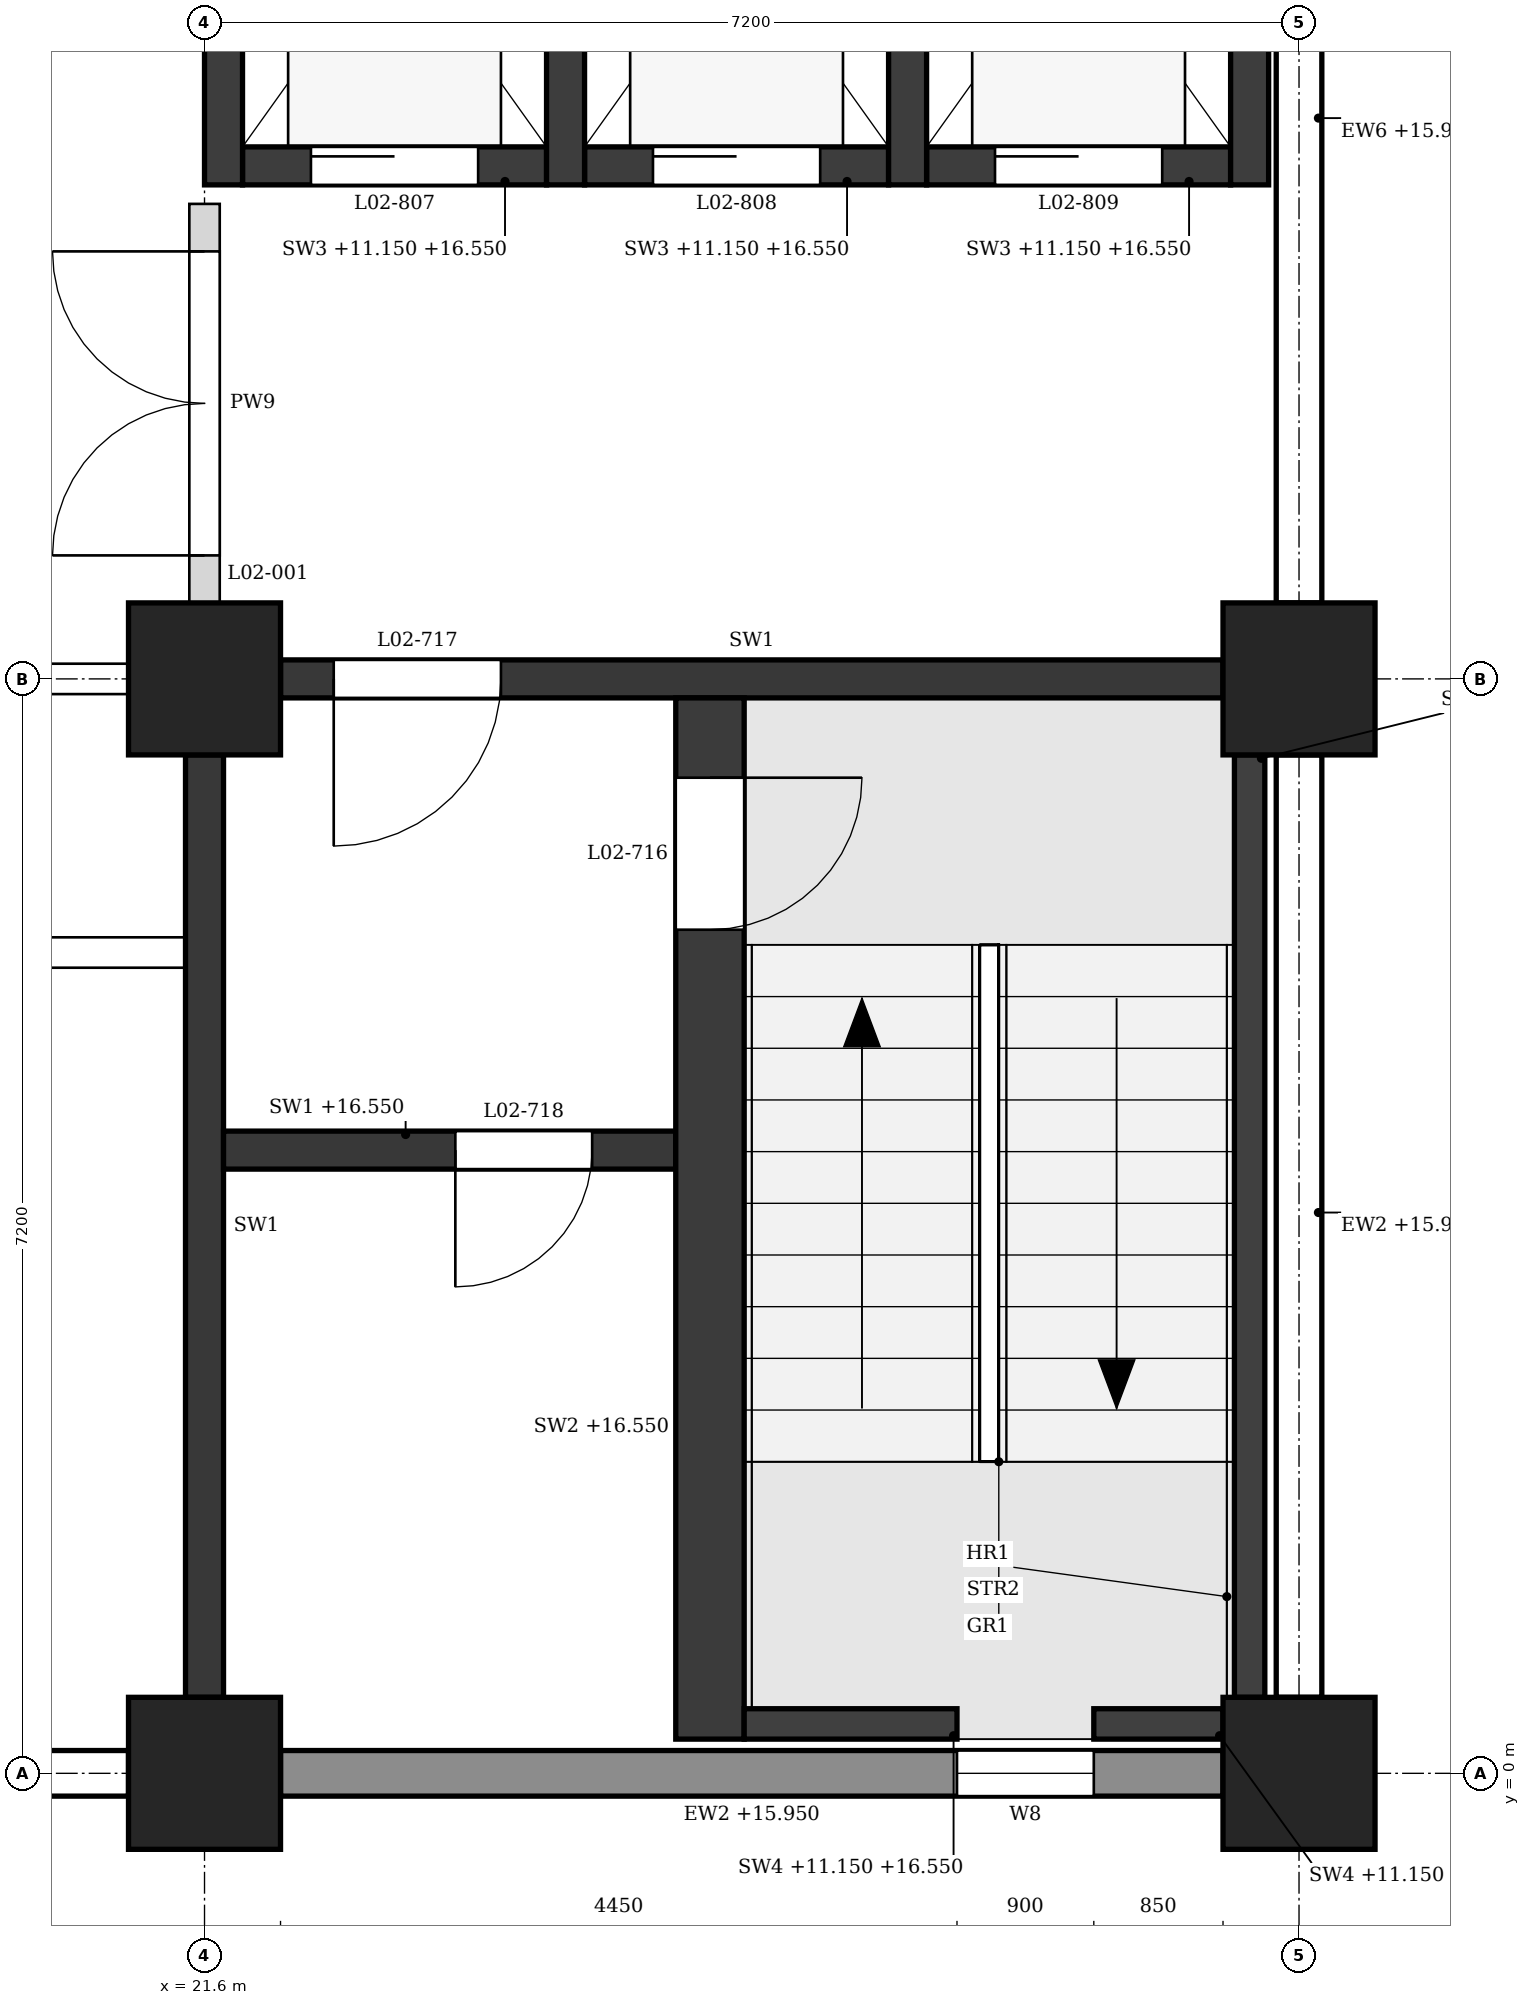
"""IFC4 building model, lengths in metres.
Left out: names, types, materials, properties, quantities, classifications, styles, units other than length and angle.
Written with IfcOpenShell. Run it as: python <this file> out.ifc"""

import sys

from ifc_helpers import new_model, si_unit, direction, frame, frame_2d, origin, origin_2d, place, context, subcontext, project, spatial, polyline, rectangle, outline, extrude, element, fill, save


model = new_model("IFC4")
c1 = context("Model", 3, precision=1e-05, world=origin(), true_north=direction((0.0, 1.0)))
c2 = subcontext(c1, "Body", "Model", "MODEL_VIEW")
j1 = project(units=[si_unit("LENGTHUNIT", "METRE"), si_unit("PLANEANGLEUNIT", "RADIAN")], contexts=[c1])
p1 = place(None, origin())
s1 = spatial("IfcSite", under=j1, at=p1, CompositionType="ELEMENT")
p2 = place(p1, origin())
s2 = spatial("IfcBuilding", under=s1, at=p2, CompositionType="ELEMENT")
p3 = place(p2, frame((0.0, 0.0, 11.4)))
s3 = spatial("IfcBuildingStorey", under=s2, at=p3, CompositionType="ELEMENT", Elevation=11.4)
for number, where, z_axis, x_axis in (
    (1, (21.6, 0.0, 0.0), (0.0, 0.0, 1.0), (1.0, 0.0, 0.0)),
    (2, (21.6, 7.2, 0.0), (0.0, 0.0, 1.0), (1.0, 0.0, 0.0)),
    (3, (28.8, 0.0, 0.0), (0.0, 0.0, 1.0), (1.0, 0.0, 0.0)),
    (4, (28.8, 7.2, 0.0), (0.0, 0.0, 1.0), (1.0, 0.0, 0.0)),
):
    element("IfcColumn", number, at=place(p3, frame(where, z_axis=z_axis, x_axis=x_axis)), inside=s3, PredefinedType="COLUMN", context=c2, shape_type="SweptSolid", body=[
        extrude(rectangle(XDim=1.0, YDim=1.0, at=origin_2d()), origin(), (0.0, 0.0, 1.0), 5.4),
    ])
p4 = place(p3, frame((14.9, 0.0, 0.0), z_axis=(0.0, 0.0, 1.0), x_axis=(1.0, 0.0, 0.0)))
e5 = element("IfcWall", 5, at=p4, inside=s3, PredefinedType="STANDARD", context=c2, shape_type="SweptSolid", body=[
    extrude(rectangle(XDim=6.2, YDim=0.3, at=frame_2d((3.1, 0.0))), origin(), (0.0, 0.0, 1.0), 4.55),
])
p5 = place(p4, frame((0.55, 0.0, 0.9)))
e6 = element("IfcOpeningElement", 6, at=p5, cuts=e5, PredefinedType="OPENING", context=c2, shape_type="SweptSolid", body=[
    extrude(outline(polyline([(0.0, 0.0), (1.5, 0.0), (1.5, 2.35), (0.75, 3.1), (0.0, 2.35), (0.0, 0.0)])), frame((0.0, 0.16, 0.0), z_axis=(0.0, -1.0, 0.0), x_axis=(1.0, 0.0, 0.0)), (0.0, 0.0, 1.0), 0.32),
])
p6 = place(p4, frame((4.15, 0.0, 0.9)))
e7 = element("IfcOpeningElement", 7, at=p6, cuts=e5, PredefinedType="OPENING", context=c2, shape_type="SweptSolid", body=[
    extrude(outline(polyline([(0.0, 0.0), (1.5, 0.0), (1.5, 2.35), (0.75, 3.1), (0.0, 2.35), (0.0, 0.0)])), frame((0.0, 0.16, 0.0), z_axis=(0.0, -1.0, 0.0), x_axis=(1.0, 0.0, 0.0)), (0.0, 0.0, 1.0), 0.32),
])
p7 = place(p3, frame((22.1, 0.0, 0.0), z_axis=(0.0, 0.0, 1.0), x_axis=(1.0, 0.0, 0.0)))
e8 = element("IfcWall", 8, at=p7, inside=s3, PredefinedType="STANDARD", context=c2, shape_type="SweptSolid", body=[
    extrude(rectangle(XDim=6.2, YDim=0.3, at=frame_2d((3.1, 0.0))), origin(), (0.0, 0.0, 1.0), 4.55),
])
p8 = place(p7, frame((4.45, 0.0, 0.9)))
e9 = element("IfcOpeningElement", 9, at=p8, cuts=e8, PredefinedType="OPENING", context=c2, shape_type="SweptSolid", body=[
    extrude(outline(polyline([(0.0, 0.0), (0.9, 0.0), (0.9, 2.65), (0.45, 3.1), (0.0, 2.65), (0.0, 0.0)])), frame((0.0, 0.16, 0.0), z_axis=(0.0, -1.0, 0.0), x_axis=(1.0, 0.0, 0.0)), (0.0, 0.0, 1.0), 0.32),
])
for number, where, z_axis, x_axis in (
    (10, (28.8, 0.5, 0.0), (0.0, 0.0, 1.0), (0.0, 1.0, 0.0)),
    (11, (28.8, 7.7, 0.0), (0.0, 0.0, 1.0), (0.0, 1.0, 0.0)),
):
    element("IfcWall", number, at=place(p3, frame(where, z_axis=z_axis, x_axis=x_axis)), inside=s3, PredefinedType="STANDARD", context=c2, shape_type="SweptSolid", body=[
        extrude(rectangle(XDim=6.2, YDim=0.3, at=frame_2d((3.1, 0.0))), origin(), (0.0, 0.0, 1.0), 4.55),
    ])
p9 = place(p3, frame((22.1, 7.2, 0.0), z_axis=(0.0, 0.0, 1.0), x_axis=(1.0, 0.0, 0.0)))
e12 = element("IfcWall", 12, at=p9, inside=s3, PredefinedType="SHEAR", context=c2, shape_type="SweptSolid", body=[
    extrude(rectangle(XDim=6.2, YDim=0.25, at=frame_2d((3.1, 0.0))), origin(), (0.0, 0.0, 1.0), 4.4),
])
p10 = place(p9, frame((0.35, 0.0, 0.0)))
e13 = element("IfcOpeningElement", 13, at=p10, cuts=e12, PredefinedType="OPENING", context=c2, shape_type="SweptSolid", body=[
    extrude(rectangle(XDim=1.1, YDim=2.1, at=frame_2d((0.55, 1.05))), frame((0.0, 0.135, 0.0), z_axis=(0.0, -1.0, 0.0), x_axis=(1.0, 0.0, 0.0)), (0.0, 0.0, 1.0), 0.27),
])
p11 = place(p3, frame((21.6, 0.5, 0.0), z_axis=(0.0, 0.0, 1.0), x_axis=(0.0, 1.0, 0.0)))
e14 = element("IfcWall", 14, at=p11, inside=s3, PredefinedType="SHEAR", context=c2, shape_type="SweptSolid", body=[
    extrude(rectangle(XDim=6.2, YDim=0.25, at=frame_2d((3.1, 0.0))), origin(), (0.0, 0.0, 1.0), 4.4),
])
p12 = place(p3, frame((28.475, 0.5, -0.25), z_axis=(0.0, 0.0, 1.0), x_axis=(0.0, 1.0, 0.0)))
e15 = element("IfcWall", 15, at=p12, inside=s3, PredefinedType="SHEAR", context=c2, shape_type="SweptSolid", body=[
    extrude(rectangle(XDim=6.2, YDim=0.2, at=frame_2d((3.1, 0.0))), origin(), (0.0, 0.0, 1.0), 5.4),
])
p13 = place(p3, frame((25.15, 0.325, -0.25), z_axis=(0.0, 0.0, 1.0), x_axis=(1.0, 0.0, 0.0)))
e16 = element("IfcWall", 16, at=p13, inside=s3, PredefinedType="SHEAR", context=c2, shape_type="SweptSolid", body=[
    extrude(rectangle(XDim=1.4, YDim=0.2, at=frame_2d((0.7, 0.0))), origin(), (0.0, 0.0, 1.0), 5.4),
])
p14 = place(p3, frame((27.45, 0.325, -0.25), z_axis=(0.0, 0.0, 1.0), x_axis=(1.0, 0.0, 0.0)))
e17 = element("IfcWall", 17, at=p14, inside=s3, PredefinedType="SHEAR", context=c2, shape_type="SweptSolid", body=[
    extrude(rectangle(XDim=0.85, YDim=0.2, at=frame_2d((0.425, 0.0))), origin(), (0.0, 0.0, 1.0), 5.4),
])
p15 = place(p3, frame((24.925, 0.225, 0.0), z_axis=(0.0, 0.0, 1.0), x_axis=(0.0, 1.0, 0.0)))
e18 = element("IfcWall", 18, at=p15, inside=s3, PredefinedType="SHEAR", context=c2, shape_type="SweptSolid", body=[
    extrude(rectangle(XDim=6.85, YDim=0.45, at=frame_2d((3.425, 0.0))), origin(), (0.0, 0.0, 1.0), 5.15),
])
p16 = place(p15, frame((5.325, 0.0, 0.0)))
e19 = element("IfcOpeningElement", 19, at=p16, cuts=e18, PredefinedType="OPENING", context=c2, shape_type="SweptSolid", body=[
    extrude(rectangle(XDim=1.0, YDim=2.1, at=frame_2d((0.5, 1.05))), frame((0.0, 0.235, 0.0), z_axis=(0.0, -1.0, 0.0), x_axis=(1.0, 0.0, 0.0)), (0.0, 0.0, 1.0), 0.47),
])
p17 = place(p3, frame((21.725, 4.1, 0.0), z_axis=(0.0, 0.0, 1.0), x_axis=(1.0, 0.0, 0.0)))
e20 = element("IfcWall", 20, at=p17, inside=s3, PredefinedType="SHEAR", context=c2, shape_type="SweptSolid", body=[
    extrude(rectangle(XDim=2.975, YDim=0.25, at=frame_2d((1.487, 0.0))), origin(), (0.0, 0.0, 1.0), 5.15),
])
p18 = place(p17, frame((1.525, 0.0, 0.0)))
e21 = element("IfcOpeningElement", 21, at=p18, cuts=e20, PredefinedType="OPENING", context=c2, shape_type="SweptSolid", body=[
    extrude(rectangle(XDim=0.9, YDim=2.1, at=frame_2d((0.45, 1.05))), frame((0.0, 0.135, 0.0), z_axis=(0.0, -1.0, 0.0), x_axis=(1.0, 0.0, 0.0)), (0.0, 0.0, 1.0), 0.27),
])
p19 = place(p3, frame((21.725, 10.45, -0.25), z_axis=(0.0, 0.0, 1.0), x_axis=(0.0, 1.0, 0.0)))
e22 = element("IfcWall", 22, at=p19, inside=s3, PredefinedType="SHEAR", context=c2, shape_type="SweptSolid", body=[
    extrude(rectangle(XDim=3.45, YDim=0.25, at=frame_2d((1.725, 0.0))), origin(), (0.0, 0.0, 1.0), 4.65),
])
for number, where, z_axis, x_axis in (
    (23, (23.975, 10.45, -0.25), (0.0, 0.0, 1.0), (0.0, 1.0, 0.0)),
    (24, (26.225, 10.45, -0.25), (0.0, 0.0, 1.0), (0.0, 1.0, 0.0)),
):
    element("IfcWall", number, at=place(p3, frame(where, z_axis=z_axis, x_axis=x_axis)), inside=s3, PredefinedType="SHEAR", context=c2, shape_type="SweptSolid", body=[
        extrude(rectangle(XDim=3.3, YDim=0.25, at=frame_2d((1.65, 0.0))), origin(), (0.0, 0.0, 1.0), 5.4),
    ])
p20 = place(p3, frame((28.475, 10.45, -0.25), z_axis=(0.0, 0.0, 1.0), x_axis=(0.0, 1.0, 0.0)))
e25 = element("IfcWall", 25, at=p20, inside=s3, PredefinedType="SHEAR", context=c2, shape_type="SweptSolid", body=[
    extrude(rectangle(XDim=3.45, YDim=0.25, at=frame_2d((1.725, 0.0))), origin(), (0.0, 0.0, 1.0), 5.4),
])
p21 = place(p3, frame((21.85, 10.575, -0.25), z_axis=(0.0, 0.0, 1.0), x_axis=(1.0, 0.0, 0.0)))
e26 = element("IfcWall", 26, at=p21, inside=s3, PredefinedType="SHEAR", context=c2, shape_type="SweptSolid", body=[
    extrude(rectangle(XDim=2.0, YDim=0.25, at=frame_2d((1.0, 0.0))), origin(), (0.0, 0.0, 1.0), 5.4),
])
p22 = place(p21, frame((0.45, 0.0, 0.25)))
e27 = element("IfcOpeningElement", 27, at=p22, cuts=e26, PredefinedType="OPENING", context=c2, shape_type="SweptSolid", body=[
    extrude(rectangle(XDim=1.1, YDim=2.1, at=frame_2d((0.55, 1.05))), frame((0.0, 0.135, 0.0), z_axis=(0.0, -1.0, 0.0), x_axis=(1.0, 0.0, 0.0)), (0.0, 0.0, 1.0), 0.27),
])
p23 = place(p3, frame((24.1, 10.575, -0.25), z_axis=(0.0, 0.0, 1.0), x_axis=(1.0, 0.0, 0.0)))
e28 = element("IfcWall", 28, at=p23, inside=s3, PredefinedType="SHEAR", context=c2, shape_type="SweptSolid", body=[
    extrude(rectangle(XDim=2.0, YDim=0.25, at=frame_2d((1.0, 0.0))), origin(), (0.0, 0.0, 1.0), 5.4),
])
p24 = place(p23, frame((0.45, 0.0, 0.25)))
e29 = element("IfcOpeningElement", 29, at=p24, cuts=e28, PredefinedType="OPENING", context=c2, shape_type="SweptSolid", body=[
    extrude(rectangle(XDim=1.1, YDim=2.1, at=frame_2d((0.55, 1.05))), frame((0.0, 0.135, 0.0), z_axis=(0.0, -1.0, 0.0), x_axis=(1.0, 0.0, 0.0)), (0.0, 0.0, 1.0), 0.27),
])
p25 = place(p3, frame((26.35, 10.575, -0.25), z_axis=(0.0, 0.0, 1.0), x_axis=(1.0, 0.0, 0.0)))
e30 = element("IfcWall", 30, at=p25, inside=s3, PredefinedType="SHEAR", context=c2, shape_type="SweptSolid", body=[
    extrude(rectangle(XDim=2.0, YDim=0.25, at=frame_2d((1.0, 0.0))), origin(), (0.0, 0.0, 1.0), 5.4),
])
p26 = place(p25, frame((0.45, 0.0, 0.25)))
e31 = element("IfcOpeningElement", 31, at=p26, cuts=e30, PredefinedType="OPENING", context=c2, shape_type="SweptSolid", body=[
    extrude(rectangle(XDim=1.1, YDim=2.1, at=frame_2d((0.55, 1.05))), frame((0.0, 0.135, 0.0), z_axis=(0.0, -1.0, 0.0), x_axis=(1.0, 0.0, 0.0)), (0.0, 0.0, 1.0), 0.27),
])
p27 = place(p3, frame((7.325, 5.4, 0.0), z_axis=(0.0, 0.0, 1.0), x_axis=(1.0, 0.0, 0.0)))
e32 = element("IfcWall", 32, at=p27, inside=s3, PredefinedType="PARTITIONING", context=c2, shape_type="SweptSolid", body=[
    extrude(outline(polyline([(0.0, 0.0), (14.15, 0.0), (14.15, 4.4), (14.025, 4.4), (14.025, 5.15), (7.325, 5.15), (7.325, 4.4), (6.825, 4.4), (6.825, 5.15), (0.125, 5.15), (0.125, 4.4), (0.0, 4.4), (0.0, 0.0)])), frame((0.0, 0.1, 0.0), z_axis=(0.0, -1.0, 0.0), x_axis=(1.0, 0.0, 0.0)), (0.0, 0.0, 1.0), 0.2),
])
p28 = place(p27, frame((1.238, 0.0, 0.0)))
e33 = element("IfcOpeningElement", 33, at=p28, cuts=e32, PredefinedType="OPENING", context=c2, shape_type="SweptSolid", body=[
    extrude(rectangle(XDim=1.0, YDim=2.1, at=frame_2d((0.5, 1.05))), frame((0.0, 0.11, 0.0), z_axis=(0.0, -1.0, 0.0), x_axis=(1.0, 0.0, 0.0)), (0.0, 0.0, 1.0), 0.22),
])
p29 = place(p27, frame((4.775, 0.0, 0.0)))
e34 = element("IfcOpeningElement", 34, at=p29, cuts=e32, PredefinedType="OPENING", context=c2, shape_type="SweptSolid", body=[
    extrude(rectangle(XDim=1.0, YDim=2.1, at=frame_2d((0.5, 1.05))), frame((0.0, 0.11, 0.0), z_axis=(0.0, -1.0, 0.0), x_axis=(1.0, 0.0, 0.0)), (0.0, 0.0, 1.0), 0.22),
])
p30 = place(p27, frame((8.375, 0.0, 0.0)))
e35 = element("IfcOpeningElement", 35, at=p30, cuts=e32, PredefinedType="OPENING", context=c2, shape_type="SweptSolid", body=[
    extrude(rectangle(XDim=1.0, YDim=2.1, at=frame_2d((0.5, 1.05))), frame((0.0, 0.11, 0.0), z_axis=(0.0, -1.0, 0.0), x_axis=(1.0, 0.0, 0.0)), (0.0, 0.0, 1.0), 0.22),
])
p31 = place(p27, frame((11.913, 0.0, 0.0)))
e36 = element("IfcOpeningElement", 36, at=p31, cuts=e32, PredefinedType="OPENING", context=c2, shape_type="SweptSolid", body=[
    extrude(rectangle(XDim=1.0, YDim=2.1, at=frame_2d((0.5, 1.05))), frame((0.0, 0.11, 0.0), z_axis=(0.0, -1.0, 0.0), x_axis=(1.0, 0.0, 0.0)), (0.0, 0.0, 1.0), 0.22),
])
p32 = place(p3, frame((14.9, 7.2, 0.0), z_axis=(0.0, 0.0, 1.0), x_axis=(1.0, 0.0, 0.0)))
e37 = element("IfcWall", 37, at=p32, inside=s3, PredefinedType="PARTITIONING", context=c2, shape_type="SweptSolid", body=[
    extrude(rectangle(XDim=6.2, YDim=0.2, at=frame_2d((3.1, 0.0))), origin(), (0.0, 0.0, 1.0), 4.4),
])
p33 = place(p32, frame((4.15, 0.0, 0.0)))
e38 = element("IfcOpeningElement", 38, at=p33, cuts=e37, PredefinedType="OPENING", context=c2, shape_type="SweptSolid", body=[
    extrude(rectangle(XDim=1.0, YDim=2.1, at=frame_2d((0.5, 1.05))), frame((0.0, 0.11, 0.0), z_axis=(0.0, -1.0, 0.0), x_axis=(1.0, 0.0, 0.0)), (0.0, 0.0, 1.0), 0.22),
])
p34 = place(p3, frame((21.6, 7.7, 0.0), z_axis=(0.0, 0.0, 1.0), x_axis=(0.0, 1.0, 0.0)))
e39 = element("IfcWall", 39, at=p34, inside=s3, PredefinedType="PARTITIONING", context=c2, shape_type="SweptSolid", body=[
    extrude(rectangle(XDim=2.625, YDim=0.2, at=frame_2d((1.312, 0.0))), origin(), (0.0, 0.0, 1.0), 4.4),
])
p35 = place(p34, frame((0.312, 0.0, 0.0)))
e40 = element("IfcOpeningElement", 40, at=p35, cuts=e39, PredefinedType="OPENING", context=c2, shape_type="SweptSolid", body=[
    extrude(rectangle(XDim=2.0, YDim=2.4, at=frame_2d((1.0, 1.2))), frame((0.0, 0.11, 0.0), z_axis=(0.0, -1.0, 0.0), x_axis=(1.0, 0.0, 0.0)), (0.0, 0.0, 1.0), 0.22),
])
p36 = place(p8, origin())
e41 = element("IfcWindow", 41, at=p36, inside=s3, PartitioningType="SINGLE_PANEL", PredefinedType="WINDOW", context=c2, shape_type="SweptSolid", body=[
    extrude(outline(polyline([(0.0, 0.0), (0.9, 0.0), (0.9, 2.65), (0.45, 3.1), (0.0, 2.65), (0.0, 0.0)])), frame((0.0, 0.03, 0.0), z_axis=(0.0, -1.0, 0.0), x_axis=(1.0, 0.0, 0.0)), (0.0, 0.0, 1.0), 0.06),
])
fill(e9, e41)
p37 = place(p16, frame((1.0, 0.0, 0.0), z_axis=(0.0, 0.0, 1.0), x_axis=(-1.0, 0.0, 0.0)))
e42 = element("IfcDoor", 42, at=p37, inside=s3, OperationType="SINGLE_SWING_LEFT", PredefinedType="DOOR", context=c2, shape_type="SweptSolid", body=[
    extrude(rectangle(XDim=1.0, YDim=2.1, at=frame_2d((0.5, 1.05))), frame((0.0, 0.025, 0.0), z_axis=(0.0, -1.0, 0.0), x_axis=(1.0, 0.0, 0.0)), (0.0, 0.0, 1.0), 0.05),
])
fill(e19, e42)
p38 = place(p10, frame((1.1, 0.0, 0.0), z_axis=(0.0, 0.0, 1.0), x_axis=(-1.0, 0.0, 0.0)))
e43 = element("IfcDoor", 43, at=p38, inside=s3, OperationType="SINGLE_SWING_RIGHT", PredefinedType="DOOR", context=c2, shape_type="SweptSolid", body=[
    extrude(rectangle(XDim=1.1, YDim=2.1, at=frame_2d((0.55, 1.05))), frame((0.0, 0.025, 0.0), z_axis=(0.0, -1.0, 0.0), x_axis=(1.0, 0.0, 0.0)), (0.0, 0.0, 1.0), 0.05),
])
fill(e13, e43)
p39 = place(p18, frame((0.9, 0.0, 0.0), z_axis=(0.0, 0.0, 1.0), x_axis=(-1.0, 0.0, 0.0)))
e44 = element("IfcDoor", 44, at=p39, inside=s3, OperationType="SINGLE_SWING_RIGHT", PredefinedType="DOOR", context=c2, shape_type="SweptSolid", body=[
    extrude(rectangle(XDim=0.9, YDim=2.1, at=frame_2d((0.45, 1.05))), frame((0.0, 0.025, 0.0), z_axis=(0.0, -1.0, 0.0), x_axis=(1.0, 0.0, 0.0)), (0.0, 0.0, 1.0), 0.05),
])
fill(e21, e44)
p40 = place(p22, origin())
e45 = element("IfcDoor", 45, at=p40, inside=s3, OperationType="SLIDING_TO_LEFT", PredefinedType="DOOR", context=c2, shape_type="SweptSolid", body=[
    extrude(rectangle(XDim=1.1, YDim=2.1, at=frame_2d((0.55, 1.05))), frame((0.0, 0.025, 0.0), z_axis=(0.0, -1.0, 0.0), x_axis=(1.0, 0.0, 0.0)), (0.0, 0.0, 1.0), 0.05),
])
fill(e27, e45)
p41 = place(p24, origin())
e46 = element("IfcDoor", 46, at=p41, inside=s3, OperationType="SLIDING_TO_LEFT", PredefinedType="DOOR", context=c2, shape_type="SweptSolid", body=[
    extrude(rectangle(XDim=1.1, YDim=2.1, at=frame_2d((0.55, 1.05))), frame((0.0, 0.025, 0.0), z_axis=(0.0, -1.0, 0.0), x_axis=(1.0, 0.0, 0.0)), (0.0, 0.0, 1.0), 0.05),
])
fill(e29, e46)
p42 = place(p26, origin())
e47 = element("IfcDoor", 47, at=p42, inside=s3, OperationType="SLIDING_TO_LEFT", PredefinedType="DOOR", context=c2, shape_type="SweptSolid", body=[
    extrude(rectangle(XDim=1.1, YDim=2.1, at=frame_2d((0.55, 1.05))), frame((0.0, 0.025, 0.0), z_axis=(0.0, -1.0, 0.0), x_axis=(1.0, 0.0, 0.0)), (0.0, 0.0, 1.0), 0.05),
])
fill(e31, e47)
p43 = place(p35, origin())
e48 = element("IfcDoor", 48, at=p43, inside=s3, OperationType="DOUBLE_DOOR_SINGLE_SWING", PredefinedType="DOOR", context=c2, shape_type="SweptSolid", body=[
    extrude(rectangle(XDim=2.0, YDim=2.4, at=frame_2d((1.0, 1.2))), frame((0.0, 0.025, 0.0), z_axis=(0.0, -1.0, 0.0), x_axis=(1.0, 0.0, 0.0)), (0.0, 0.0, 1.0), 0.05),
])
fill(e40, e48)
save(model, sys.argv[1])
